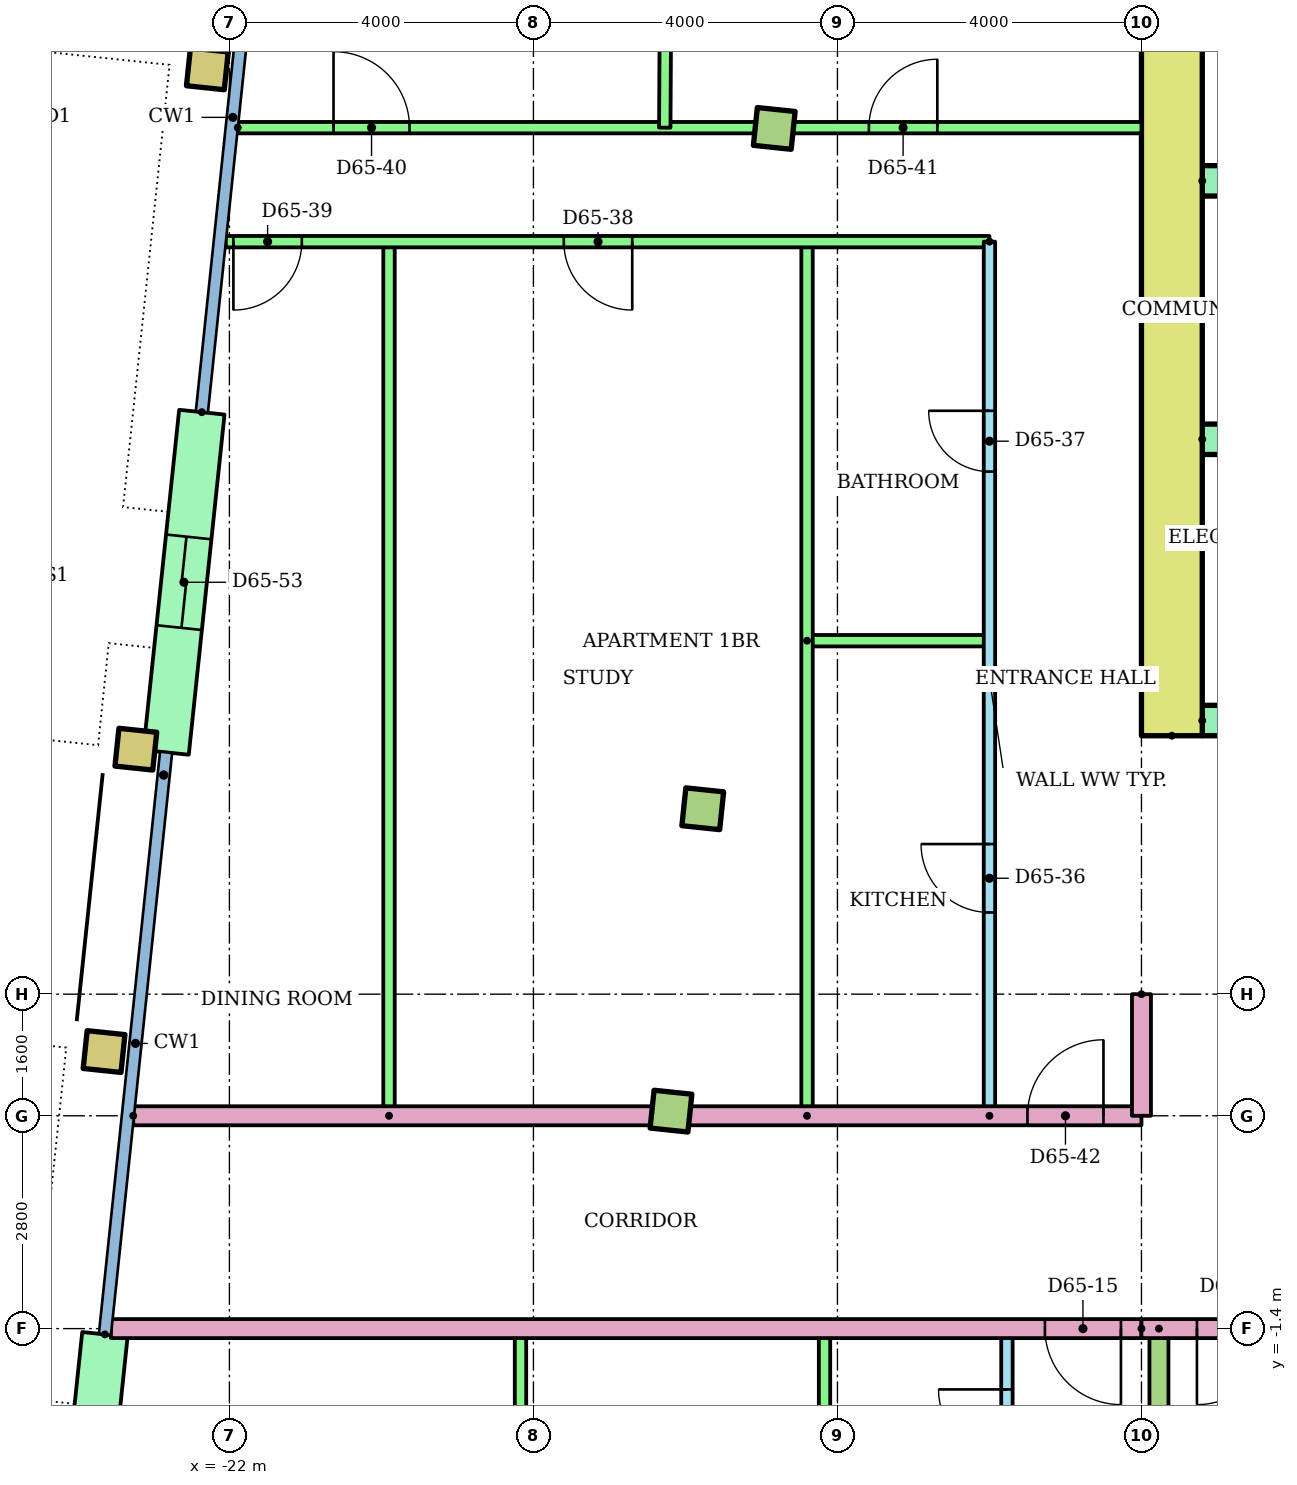
"""IFC4 building model, lengths in metres.
Left out: names, types, materials, properties, quantities, classifications, styles, units other than length and angle.
Written with IfcOpenShell. Run it as: python <this file> out.ifc"""

import sys

from ifc_helpers import new_model, si_unit, direction, frame, frame_2d, origin, origin_2d, place, context, subcontext, project, spatial, rectangle, hollow_rectangle, extrude, element, fill, save


model = new_model("IFC4")
c1 = context("Model", 3, precision=1e-05, world=origin(), true_north=direction((0.0, 1.0)))
c2 = subcontext(c1, "Body", "Model", "MODEL_VIEW")
j1 = project(units=[si_unit("LENGTHUNIT", "METRE"), si_unit("PLANEANGLEUNIT", "RADIAN")], contexts=[c1])
p1 = place(None, origin())
s1 = spatial("IfcSite", under=j1, at=p1, CompositionType="ELEMENT")
p2 = place(p1, origin())
s2 = spatial("IfcBuilding", under=s1, at=p2, CompositionType="ELEMENT")
p3 = place(p2, frame((0.0, 0.0, 253.1)))
s3 = spatial("IfcBuildingStorey", under=s2, at=p3, CompositionType="ELEMENT", Elevation=253.1)
p4 = place(p3, frame((-23.649, 2.245, 0.0), z_axis=(0.0, 0.0, 1.0), x_axis=(0.994521895368, -0.104528463268, 0.0)))
e1 = element("IfcColumn", 1, at=p4, inside=s3, PredefinedType="COLUMN", context=c2, shape_type="SweptSolid", body=[
    extrude(hollow_rectangle(XDim=0.5, YDim=0.5, WallThickness=0.025, at=origin_2d()), origin(), (0.0, 0.0, 1.0), 3.2),
])
p5 = place(p3, frame((-16.19, 1.461, 0.0), z_axis=(0.0, 0.0, 1.0), x_axis=(0.994521895368, -0.104528463268, 0.0)))
e2 = element("IfcColumn", 2, at=p5, inside=s3, PredefinedType="COLUMN", context=c2, shape_type="SweptSolid", body=[
    extrude(rectangle(XDim=0.5, YDim=0.5, at=origin_2d()), origin(), (0.0, 0.0, 1.0), 3.2),
])
p6 = place(p3, frame((-23.231, 6.223, 0.0), z_axis=(0.0, 0.0, 1.0), x_axis=(0.994521895368, -0.104528463268, 0.0)))
e3 = element("IfcColumn", 3, at=p6, inside=s3, PredefinedType="COLUMN", context=c2, shape_type="SweptSolid", body=[
    extrude(hollow_rectangle(XDim=0.5, YDim=0.5, WallThickness=0.025, at=origin_2d()), origin(), (0.0, 0.0, 1.0), 3.2),
])
p7 = place(p3, frame((-15.772, 5.439, 0.0), z_axis=(0.0, 0.0, 1.0), x_axis=(0.994521895368, -0.104528463268, 0.0)))
e4 = element("IfcColumn", 4, at=p7, inside=s3, PredefinedType="COLUMN", context=c2, shape_type="SweptSolid", body=[
    extrude(rectangle(XDim=0.5, YDim=0.5, at=origin_2d()), origin(), (0.0, 0.0, 1.0), 3.2),
])
p8 = place(p3, frame((-22.29, 15.174, 0.0), z_axis=(0.0, 0.0, 1.0), x_axis=(0.994521895368, -0.104528463268, 0.0)))
e5 = element("IfcColumn", 5, at=p8, inside=s3, PredefinedType="COLUMN", context=c2, shape_type="SweptSolid", body=[
    extrude(hollow_rectangle(XDim=0.5, YDim=0.5, WallThickness=0.025, at=origin_2d()), origin(), (0.0, 0.0, 1.0), 3.2),
])
p9 = place(p3, frame((-14.831, 14.39, 0.0), z_axis=(0.0, 0.0, 1.0), x_axis=(0.994521895368, -0.104528463268, 0.0)))
e6 = element("IfcColumn", 6, at=p9, inside=s3, PredefinedType="COLUMN", context=c2, shape_type="SweptSolid", body=[
    extrude(rectangle(XDim=0.5, YDim=0.5, at=origin_2d()), origin(), (0.0, 0.0, 1.0), 3.2),
])
p10 = place(p3, frame((-22.363, 10.657, 0.0), z_axis=(0.0, 0.0, 1.0), x_axis=(-0.104492739125, -0.994525649478, 0.0)))
e7 = element("IfcWall", 7, at=p10, inside=s3, PredefinedType="STANDARD", context=c2, shape_type="SweptSolid", body=[
    extrude(rectangle(XDim=4.5, YDim=0.6, at=frame_2d((2.25, 0.0))), origin(), (0.0, 0.0, 1.0), 2.92),
])
p11 = place(p10, frame((1.65, 0.0, 0.0)))
e8 = element("IfcOpeningElement", 8, at=p11, cuts=e7, PredefinedType="OPENING", context=c2, shape_type="SweptSolid", body=[
    extrude(rectangle(XDim=1.2, YDim=2.1, at=frame_2d((0.6, 1.05))), frame((0.0, 0.31, 0.0), z_axis=(0.0, -1.0, 0.0), x_axis=(1.0, 0.0, 0.0)), (0.0, 0.0, 1.0), 0.62),
])
p12 = place(p3, frame((-23.638, -1.476, 0.0), z_axis=(0.0, 0.0, 1.0), x_axis=(-0.104513052986, -0.994523514933, 0.0)))
e9 = element("IfcWall", 9, at=p12, inside=s3, PredefinedType="STANDARD", context=c2, shape_type="SweptSolid", body=[
    extrude(rectangle(XDim=3.7, YDim=0.6, at=frame_2d((1.85, 0.0))), origin(), (0.0, 0.0, 1.0), 2.92),
])
p13 = place(p12, frame((1.25, 0.0, 0.0)))
e10 = element("IfcOpeningElement", 10, at=p13, cuts=e9, PredefinedType="OPENING", context=c2, shape_type="SweptSolid", body=[
    extrude(rectangle(XDim=1.2, YDim=2.1, at=frame_2d((0.6, 1.05))), frame((0.0, 0.31, 0.0), z_axis=(0.0, -1.0, 0.0), x_axis=(1.0, 0.0, 0.0)), (0.0, 0.0, 1.0), 0.62),
])
p14 = place(p3, frame((-9.6, 6.4, 0.0), z_axis=(0.0, 0.0, 1.0), x_axis=(0.0, 1.0, 0.0)))
e11 = element("IfcWall", 11, at=p14, inside=s3, PredefinedType="SHEAR", context=c2, shape_type="SweptSolid", body=[
    extrude(rectangle(XDim=13.6, YDim=0.8, at=frame_2d((6.8, 0.0))), origin(), (0.0, 0.0, 1.0), 2.92),
])
p15 = place(p3, frame((-9.2, 6.6, 0.0)))
e12 = element("IfcWall", 12, at=p15, inside=s3, PredefinedType="SHEAR", context=c2, shape_type="SweptSolid", body=[
    extrude(rectangle(XDim=18.4, YDim=0.4, at=frame_2d((9.2, 0.0))), origin(), (0.0, 0.0, 1.0), 2.92),
])
p16 = place(p15, frame((8.3, 0.0, 0.0)))
e13 = element("IfcOpeningElement", 13, at=p16, cuts=e12, PredefinedType="OPENING", context=c2, shape_type="SweptSolid", body=[
    extrude(rectangle(XDim=1.8, YDim=2.1, at=frame_2d((0.9, 1.05))), frame((0.0, 0.21, 0.0), z_axis=(0.0, -1.0, 0.0), x_axis=(1.0, 0.0, 0.0)), (0.0, 0.0, 1.0), 0.42),
])
p17 = place(p15, frame((3.8, 0.0, 0.0)))
e14 = element("IfcOpeningElement", 14, at=p17, cuts=e12, PredefinedType="OPENING", context=c2, shape_type="SweptSolid", body=[
    extrude(rectangle(XDim=1.8, YDim=2.1, at=frame_2d((0.9, 1.05))), frame((0.0, 0.21, 0.0), z_axis=(0.0, -1.0, 0.0), x_axis=(1.0, 0.0, 0.0)), (0.0, 0.0, 1.0), 0.42),
])
p18 = place(p15, frame((12.8, 0.0, 0.0)))
e15 = element("IfcOpeningElement", 15, at=p18, cuts=e12, PredefinedType="OPENING", context=c2, shape_type="SweptSolid", body=[
    extrude(rectangle(XDim=1.8, YDim=2.1, at=frame_2d((0.9, 1.05))), frame((0.0, 0.21, 0.0), z_axis=(0.0, -1.0, 0.0), x_axis=(1.0, 0.0, 0.0)), (0.0, 0.0, 1.0), 0.42),
])
p19 = place(p3, frame((-9.2, 10.3, 0.0)))
e16 = element("IfcWall", 16, at=p19, inside=s3, PredefinedType="SHEAR", context=c2, shape_type="SweptSolid", body=[
    extrude(rectangle(XDim=8.0, YDim=0.4, at=frame_2d((4.0, 0.0))), origin(), (0.0, 0.0, 1.0), 2.92),
])
p20 = place(p19, frame((3.35, 0.0, 0.0)))
e17 = element("IfcOpeningElement", 17, at=p20, cuts=e16, PredefinedType="OPENING", context=c2, shape_type="SweptSolid", body=[
    extrude(rectangle(XDim=1.1, YDim=2.1, at=frame_2d((0.55, 1.05))), frame((0.0, 0.21, 0.0), z_axis=(0.0, -1.0, 0.0), x_axis=(1.0, 0.0, 0.0)), (0.0, 0.0, 1.0), 0.42),
])
p21 = place(p19, frame((6.083, 0.0, 0.0)))
e18 = element("IfcOpeningElement", 18, at=p21, cuts=e16, PredefinedType="OPENING", context=c2, shape_type="SweptSolid", body=[
    extrude(rectangle(XDim=1.1, YDim=2.1, at=frame_2d((0.55, 1.05))), frame((0.0, 0.21, 0.0), z_axis=(0.0, -1.0, 0.0), x_axis=(1.0, 0.0, 0.0)), (0.0, 0.0, 1.0), 0.42),
])
p22 = place(p19, frame((0.917, 0.0, 0.0)))
e19 = element("IfcOpeningElement", 19, at=p22, cuts=e16, PredefinedType="OPENING", context=c2, shape_type="SweptSolid", body=[
    extrude(rectangle(XDim=1.0, YDim=2.1, at=frame_2d((0.5, 1.05))), frame((0.0, 0.21, 0.0), z_axis=(0.0, -1.0, 0.0), x_axis=(1.0, 0.0, 0.0)), (0.0, 0.0, 1.0), 0.42),
])
p23 = place(p3, frame((-9.2, 13.7, 0.0)))
e20 = element("IfcWall", 20, at=p23, inside=s3, PredefinedType="SHEAR", context=c2, shape_type="SweptSolid", body=[
    extrude(rectangle(XDim=8.0, YDim=0.4, at=frame_2d((4.0, 0.0))), origin(), (0.0, 0.0, 1.0), 2.92),
])
p24 = place(p3, frame((-11.77, -5.9, 0.0), z_axis=(0.0, 0.0, 1.0), x_axis=(0.0, 1.0, 0.0)))
e21 = element("IfcWall", 21, at=p24, inside=s3, PredefinedType="PARTITIONING", context=c2, shape_type="SweptSolid", body=[
    extrude(rectangle(XDim=4.5, YDim=0.15, at=frame_2d((2.25, 0.0))), origin(), (0.0, 0.0, 1.0), 2.4),
])
p25 = place(p24, frame((2.8, 0.0, 0.0)))
e22 = element("IfcOpeningElement", 22, at=p25, cuts=e21, PredefinedType="OPENING", context=c2, shape_type="SweptSolid", body=[
    extrude(rectangle(XDim=0.9, YDim=2.1, at=frame_2d((0.45, 1.05))), frame((0.0, 0.085, 0.0), z_axis=(0.0, -1.0, 0.0), x_axis=(1.0, 0.0, 0.0)), (0.0, 0.0, 1.0), 0.17),
])
p26 = place(p24, frame((0.6, 0.0, 0.0)))
e23 = element("IfcOpeningElement", 23, at=p26, cuts=e21, PredefinedType="OPENING", context=c2, shape_type="SweptSolid", body=[
    extrude(rectangle(XDim=0.8, YDim=2.1, at=frame_2d((0.4, 1.05))), frame((0.0, 0.085, 0.0), z_axis=(0.0, -1.0, 0.0), x_axis=(1.0, 0.0, 0.0)), (0.0, 0.0, 1.0), 0.17),
])
for number, where, z_axis, x_axis in (
    (24, (-14.17, -5.9, 0.0), (0.0, 0.0, 1.0), (0.0, 1.0, 0.0)),
    (25, (-18.17, -5.9, 0.0), (0.0, 0.0, 1.0), (0.0, 1.0, 0.0)),
):
    element("IfcWall", number, at=place(p3, frame(where, z_axis=z_axis, x_axis=x_axis)), inside=s3, PredefinedType="PARTITIONING", context=c2, shape_type="SweptSolid", body=[
        extrude(rectangle(XDim=4.5, YDim=0.15, at=frame_2d((2.25, 0.0))), origin(), (0.0, 0.0, 1.0), 2.4),
    ])
p27 = place(p3, frame((-9.77, -1.4, 0.0), z_axis=(0.0, 0.0, 1.0), x_axis=(0.0, -1.0, 0.0)))
e26 = element("IfcWall", 26, at=p27, inside=s3, PredefinedType="PARTITIONING", context=c2, shape_type="SweptSolid", body=[
    extrude(rectangle(XDim=12.504, YDim=0.25, at=frame_2d((6.252, 0.0))), origin(), (0.0, 0.0, 1.0), 2.4),
])
p28 = place(p3, frame((-10.0, -1.4, 0.0), z_axis=(0.0, 0.0, 1.0), x_axis=(-1.0, 0.0, 0.0)))
e27 = element("IfcWall", 27, at=p28, inside=s3, PredefinedType="PARTITIONING", context=c2, shape_type="SweptSolid", body=[
    extrude(rectangle(XDim=13.56, YDim=0.25, at=frame_2d((6.78, 0.0))), origin(), (0.0, 0.0, 1.0), 2.4),
])
p29 = place(p28, frame((0.27, 0.0, 0.0)))
e28 = element("IfcOpeningElement", 28, at=p29, cuts=e27, PredefinedType="OPENING", context=c2, shape_type="SweptSolid", body=[
    extrude(rectangle(XDim=1.0, YDim=2.1, at=frame_2d((0.5, 1.05))), frame((0.0, 0.135, 0.0), z_axis=(0.0, -1.0, 0.0), x_axis=(1.0, 0.0, 0.0)), (0.0, 0.0, 1.0), 0.27),
])
p30 = place(p3, frame((-12.0, 1.4, 0.0), z_axis=(0.0, 0.0, 1.0), x_axis=(0.0, 1.0, 0.0)))
e29 = element("IfcWall", 29, at=p30, inside=s3, PredefinedType="PARTITIONING", context=c2, shape_type="SweptSolid", body=[
    extrude(rectangle(XDim=11.5, YDim=0.15, at=frame_2d((5.75, 0.0))), origin(), (0.0, 0.0, 1.0), 2.4),
])
p31 = place(p30, frame((2.675, 0.0, 0.0)))
e30 = element("IfcOpeningElement", 30, at=p31, cuts=e29, PredefinedType="OPENING", context=c2, shape_type="SweptSolid", body=[
    extrude(rectangle(XDim=0.9, YDim=2.1, at=frame_2d((0.45, 1.05))), frame((0.0, 0.085, 0.0), z_axis=(0.0, -1.0, 0.0), x_axis=(1.0, 0.0, 0.0)), (0.0, 0.0, 1.0), 0.17),
])
p32 = place(p30, frame((8.475, 0.0, 0.0)))
e31 = element("IfcOpeningElement", 31, at=p32, cuts=e29, PredefinedType="OPENING", context=c2, shape_type="SweptSolid", body=[
    extrude(rectangle(XDim=0.8, YDim=2.1, at=frame_2d((0.4, 1.05))), frame((0.0, 0.085, 0.0), z_axis=(0.0, -1.0, 0.0), x_axis=(1.0, 0.0, 0.0)), (0.0, 0.0, 1.0), 0.17),
])
p33 = place(p3, frame((-14.4, 7.65, 0.0)))
e32 = element("IfcWall", 32, at=p33, inside=s3, PredefinedType="PARTITIONING", context=c2, shape_type="SweptSolid", body=[
    extrude(rectangle(XDim=2.4, YDim=0.15, at=frame_2d((1.2, 0.0))), origin(), (0.0, 0.0, 1.0), 2.4),
])
for number, where, z_axis, x_axis in (
    (33, (-14.4, 1.4, 0.0), (0.0, 0.0, 1.0), (0.0, 1.0, 0.0)),
    (34, (-19.9, 1.4, 0.0), (0.0, 0.0, 1.0), (0.0, 1.0, 0.0)),
):
    element("IfcWall", number, at=place(p3, frame(where, z_axis=z_axis, x_axis=x_axis)), inside=s3, PredefinedType="PARTITIONING", context=c2, shape_type="SweptSolid", body=[
        extrude(rectangle(XDim=11.5, YDim=0.15, at=frame_2d((5.75, 0.0))), origin(), (0.0, 0.0, 1.0), 2.4),
    ])
p34 = place(p3, frame((-12.0, 12.9, 0.0), z_axis=(0.0, 0.0, 1.0), x_axis=(-1.0, 0.0, 0.0)))
e35 = element("IfcWall", 35, at=p34, inside=s3, PredefinedType="PARTITIONING", context=c2, shape_type="SweptSolid", body=[
    extrude(rectangle(XDim=10.047, YDim=0.15, at=frame_2d((5.024, 0.0))), origin(), (0.0, 0.0, 1.0), 2.4),
])
p35 = place(p34, frame((4.7, 0.0, 0.0)))
e36 = element("IfcOpeningElement", 36, at=p35, cuts=e35, PredefinedType="OPENING", context=c2, shape_type="SweptSolid", body=[
    extrude(rectangle(XDim=0.9, YDim=2.1, at=frame_2d((0.45, 1.05))), frame((0.0, 0.085, 0.0), z_axis=(0.0, -1.0, 0.0), x_axis=(1.0, 0.0, 0.0)), (0.0, 0.0, 1.0), 0.17),
])
p36 = place(p34, frame((9.047, 0.0, 0.0)))
e37 = element("IfcOpeningElement", 37, at=p36, cuts=e35, PredefinedType="OPENING", context=c2, shape_type="SweptSolid", body=[
    extrude(rectangle(XDim=0.9, YDim=2.1, at=frame_2d((0.45, 1.05))), frame((0.0, 0.085, 0.0), z_axis=(0.0, -1.0, 0.0), x_axis=(1.0, 0.0, 0.0)), (0.0, 0.0, 1.0), 0.17),
])
p37 = place(p3, frame((-21.89, 14.4, 0.0)))
e38 = element("IfcWall", 38, at=p37, inside=s3, PredefinedType="PARTITIONING", context=c2, shape_type="SweptSolid", body=[
    extrude(rectangle(XDim=11.89, YDim=0.15, at=frame_2d((5.945, 0.0))), origin(), (0.0, 0.0, 1.0), 2.4),
])
p38 = place(p37, frame((1.26, 0.0, 0.0)))
e39 = element("IfcOpeningElement", 39, at=p38, cuts=e38, PredefinedType="OPENING", context=c2, shape_type="SweptSolid", body=[
    extrude(rectangle(XDim=1.0, YDim=2.1, at=frame_2d((0.5, 1.05))), frame((0.0, 0.085, 0.0), z_axis=(0.0, -1.0, 0.0), x_axis=(1.0, 0.0, 0.0)), (0.0, 0.0, 1.0), 0.17),
])
p39 = place(p37, frame((8.304, 0.0, 0.0)))
e40 = element("IfcOpeningElement", 40, at=p39, cuts=e38, PredefinedType="OPENING", context=c2, shape_type="SweptSolid", body=[
    extrude(rectangle(XDim=0.9, YDim=2.1, at=frame_2d((0.45, 1.05))), frame((0.0, 0.085, 0.0), z_axis=(0.0, -1.0, 0.0), x_axis=(1.0, 0.0, 0.0)), (0.0, 0.0, 1.0), 0.17),
])
p40 = place(p3, frame((-16.222, 22.61, 0.0), z_axis=(0.0, 0.0, 1.0), x_axis=(-0.006095634594, -0.999981421447, 0.0)))
e41 = element("IfcWall", 41, at=p40, inside=s3, PredefinedType="PARTITIONING", context=c2, shape_type="SweptSolid", body=[
    extrude(rectangle(XDim=8.211, YDim=0.15, at=frame_2d((4.105, 0.0))), origin(), (0.0, 0.0, 1.0), 2.4),
])
p41 = place(p3, frame((-23.265, 1.4, 0.0)))
e42 = element("IfcWall", 42, at=p41, inside=s3, PredefinedType="PARTITIONING", context=c2, shape_type="SweptSolid", body=[
    extrude(rectangle(XDim=13.265, YDim=0.25, at=frame_2d((6.633, 0.0))), origin(), (0.0, 0.0, 1.0), 2.4),
])
p42 = place(p41, frame((11.765, 0.0, 0.0)))
e43 = element("IfcOpeningElement", 43, at=p42, cuts=e42, PredefinedType="OPENING", context=c2, shape_type="SweptSolid", body=[
    extrude(rectangle(XDim=1.0, YDim=2.1, at=frame_2d((0.5, 1.05))), frame((0.0, 0.135, 0.0), z_axis=(0.0, -1.0, 0.0), x_axis=(1.0, 0.0, 0.0)), (0.0, 0.0, 1.0), 0.27),
])
p43 = place(p3, frame((10.0, -1.4, 0.0), z_axis=(0.0, 0.0, 1.0), x_axis=(-1.0, 0.0, 0.0)))
e44 = element("IfcWall", 44, at=p43, inside=s3, PredefinedType="PARTITIONING", context=c2, shape_type="SweptSolid", body=[
    extrude(rectangle(XDim=20.0, YDim=0.25, at=frame_2d((10.0, 0.0))), origin(), (0.0, 0.0, 1.0), 2.4),
])
p44 = place(p43, frame((18.27, 0.0, 0.0)))
e45 = element("IfcOpeningElement", 45, at=p44, cuts=e44, PredefinedType="OPENING", context=c2, shape_type="SweptSolid", body=[
    extrude(rectangle(XDim=1.0, YDim=2.1, at=frame_2d((0.5, 1.05))), frame((0.0, 0.135, 0.0), z_axis=(0.0, -1.0, 0.0), x_axis=(1.0, 0.0, 0.0)), (0.0, 0.0, 1.0), 0.27),
])
p45 = place(p3, frame((-10.0, 3.0, 0.0), z_axis=(0.0, 0.0, 1.0), x_axis=(0.0, -1.0, 0.0)))
e46 = element("IfcWall", 46, at=p45, inside=s3, PredefinedType="PARTITIONING", context=c2, shape_type="SweptSolid", body=[
    extrude(rectangle(XDim=1.6, YDim=0.25, at=frame_2d((0.8, 0.0))), origin(), (0.0, 0.0, 1.0), 2.4),
])
p46 = place(p25, origin())
e47 = element("IfcDoor", 47, at=p46, inside=s3, OperationType="SINGLE_SWING_RIGHT", PredefinedType="DOOR", context=c2, shape_type="SweptSolid", body=[
    extrude(rectangle(XDim=0.9, YDim=2.1, at=frame_2d((0.45, 1.05))), frame((0.0, 0.025, 0.0), z_axis=(0.0, -1.0, 0.0), x_axis=(1.0, 0.0, 0.0)), (0.0, 0.0, 1.0), 0.05),
])
fill(e22, e47)
p47 = place(p29, origin())
e48 = element("IfcDoor", 48, at=p47, inside=s3, OperationType="SINGLE_SWING_LEFT", PredefinedType="DOOR", context=c2, shape_type="SweptSolid", body=[
    extrude(rectangle(XDim=1.0, YDim=2.1, at=frame_2d((0.5, 1.05))), frame((0.0, 0.025, 0.0), z_axis=(0.0, -1.0, 0.0), x_axis=(1.0, 0.0, 0.0)), (0.0, 0.0, 1.0), 0.05),
])
fill(e28, e48)
p48 = place(p44, origin())
e49 = element("IfcDoor", 49, at=p48, inside=s3, OperationType="SINGLE_SWING_RIGHT", PredefinedType="DOOR", context=c2, shape_type="SweptSolid", body=[
    extrude(rectangle(XDim=1.0, YDim=2.1, at=frame_2d((0.5, 1.05))), frame((0.0, 0.025, 0.0), z_axis=(0.0, -1.0, 0.0), x_axis=(1.0, 0.0, 0.0)), (0.0, 0.0, 1.0), 0.05),
])
fill(e45, e49)
p49 = place(p31, origin())
e50 = element("IfcDoor", 50, at=p49, inside=s3, OperationType="SINGLE_SWING_RIGHT", PredefinedType="DOOR", context=c2, shape_type="SweptSolid", body=[
    extrude(rectangle(XDim=0.9, YDim=2.1, at=frame_2d((0.45, 1.05))), frame((0.0, 0.025, 0.0), z_axis=(0.0, -1.0, 0.0), x_axis=(1.0, 0.0, 0.0)), (0.0, 0.0, 1.0), 0.05),
])
fill(e30, e50)
p50 = place(p32, origin())
e51 = element("IfcDoor", 51, at=p50, inside=s3, OperationType="SINGLE_SWING_RIGHT", PredefinedType="DOOR", context=c2, shape_type="SweptSolid", body=[
    extrude(rectangle(XDim=0.8, YDim=2.1, at=frame_2d((0.4, 1.05))), frame((0.0, 0.025, 0.0), z_axis=(0.0, -1.0, 0.0), x_axis=(1.0, 0.0, 0.0)), (0.0, 0.0, 1.0), 0.05),
])
fill(e31, e51)
p51 = place(p35, origin())
e52 = element("IfcDoor", 52, at=p51, inside=s3, OperationType="SINGLE_SWING_LEFT", PredefinedType="DOOR", context=c2, shape_type="SweptSolid", body=[
    extrude(rectangle(XDim=0.9, YDim=2.1, at=frame_2d((0.45, 1.05))), frame((0.0, 0.025, 0.0), z_axis=(0.0, -1.0, 0.0), x_axis=(1.0, 0.0, 0.0)), (0.0, 0.0, 1.0), 0.05),
])
fill(e36, e52)
p52 = place(p36, origin())
e53 = element("IfcDoor", 53, at=p52, inside=s3, OperationType="SINGLE_SWING_RIGHT", PredefinedType="DOOR", context=c2, shape_type="SweptSolid", body=[
    extrude(rectangle(XDim=0.9, YDim=2.1, at=frame_2d((0.45, 1.05))), frame((0.0, 0.025, 0.0), z_axis=(0.0, -1.0, 0.0), x_axis=(1.0, 0.0, 0.0)), (0.0, 0.0, 1.0), 0.05),
])
fill(e37, e53)
p53 = place(p38, origin())
e54 = element("IfcDoor", 54, at=p53, inside=s3, OperationType="SINGLE_SWING_LEFT", PredefinedType="DOOR", context=c2, shape_type="SweptSolid", body=[
    extrude(rectangle(XDim=1.0, YDim=2.1, at=frame_2d((0.5, 1.05))), frame((0.0, 0.025, 0.0), z_axis=(0.0, -1.0, 0.0), x_axis=(1.0, 0.0, 0.0)), (0.0, 0.0, 1.0), 0.05),
])
fill(e39, e54)
p54 = place(p39, origin())
e55 = element("IfcDoor", 55, at=p54, inside=s3, OperationType="SINGLE_SWING_RIGHT", PredefinedType="DOOR", context=c2, shape_type="SweptSolid", body=[
    extrude(rectangle(XDim=0.9, YDim=2.1, at=frame_2d((0.45, 1.05))), frame((0.0, 0.025, 0.0), z_axis=(0.0, -1.0, 0.0), x_axis=(1.0, 0.0, 0.0)), (0.0, 0.0, 1.0), 0.05),
])
fill(e40, e55)
p55 = place(p42, origin())
e56 = element("IfcDoor", 56, at=p55, inside=s3, OperationType="SINGLE_SWING_RIGHT", PredefinedType="DOOR", context=c2, shape_type="SweptSolid", body=[
    extrude(rectangle(XDim=1.0, YDim=2.1, at=frame_2d((0.5, 1.05))), frame((0.0, 0.025, 0.0), z_axis=(0.0, -1.0, 0.0), x_axis=(1.0, 0.0, 0.0)), (0.0, 0.0, 1.0), 0.05),
])
fill(e43, e56)
p56 = place(p11, origin())
e57 = element("IfcDoor", 57, at=p56, inside=s3, OperationType="SLIDING_TO_LEFT", PredefinedType="DOOR", context=c2, shape_type="SweptSolid", body=[
    extrude(rectangle(XDim=1.2, YDim=2.1, at=frame_2d((0.6, 1.05))), frame((0.0, 0.025, 0.0), z_axis=(0.0, -1.0, 0.0), x_axis=(1.0, 0.0, 0.0)), (0.0, 0.0, 1.0), 0.05),
])
fill(e8, e57)
save(model, sys.argv[1])
